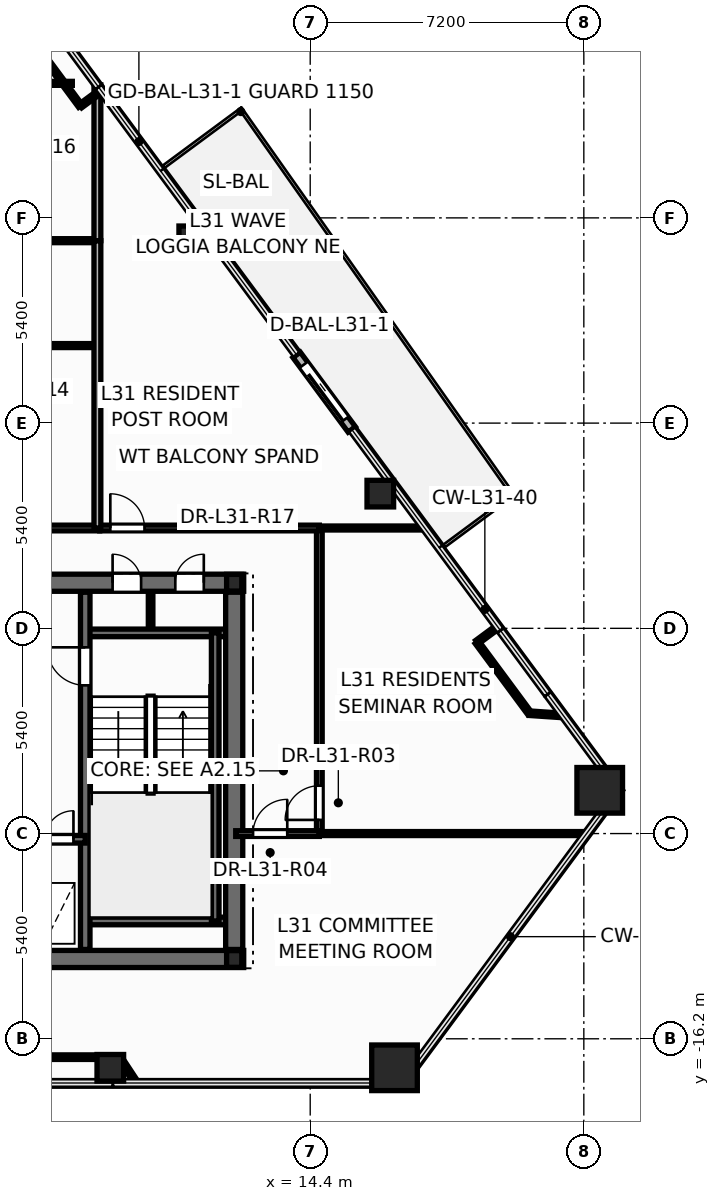
"""IFC4 building model, lengths in metres.
Left out: names, types, materials, properties, quantities, classifications, styles, units other than length and angle.
Written with IfcOpenShell. Run it as: python <this file> out.ifc"""

import sys

from ifc_helpers import new_model, si_unit, direction, frame, frame_2d, origin, origin_2d, place, context, subcontext, project, spatial, rectangle, hollow_rectangle, hollow_circle, i_section, extrude, element, fill, save


model = new_model("IFC4")
c1 = context("Model", 3, precision=1e-05, world=origin(), true_north=direction((0.0, 1.0)))
c2 = subcontext(c1, "Body", "Model", "MODEL_VIEW")
j1 = project(units=[si_unit("LENGTHUNIT", "METRE"), si_unit("PLANEANGLEUNIT", "RADIAN")], contexts=[c1])
p1 = place(None, origin())
s1 = spatial("IfcSite", under=j1, at=p1, CompositionType="ELEMENT")
p2 = place(p1, origin())
s2 = spatial("IfcBuilding", under=s1, at=p2, CompositionType="ELEMENT")
p3 = place(p2, frame((0.0, 0.0, 122.1)))
s3 = spatial("IfcBuildingStorey", under=s2, at=p3, CompositionType="ELEMENT", Elevation=122.1)
for number, where, z_axis, x_axis in (
    (1, (16.618, -16.963, 0.0), (0.0, 0.0, 1.0), (1.0, 0.0, 0.0)),
    (2, (22.019, -9.662, 0.0), (0.0, 0.0, 1.0), (1.0, 0.0, 0.0)),
):
    element("IfcColumn", number, at=place(p3, frame(where, z_axis=z_axis, x_axis=x_axis)), inside=s3, PredefinedType="COLUMN", context=c2, shape_type="SweptSolid", body=[
        extrude(hollow_rectangle(XDim=1.2, YDim=1.2, WallThickness=0.055, at=origin_2d()), origin(), (0.0, 0.0, 1.0), 3.6),
    ])
for number, where, z_axis, x_axis in (
    (3, (9.14, -16.963, 0.0), (0.0, 0.0, 1.0), (1.0, 0.0, 0.0)),
    (4, (16.245, -1.856, 0.0), (0.0, 0.0, 1.0), (1.0, 0.0, 0.0)),
    (5, (11.296, 4.836, 0.0), (0.0, 0.0, 1.0), (1.0, 0.0, 0.0)),
):
    element("IfcColumn", number, at=place(p3, frame(where, z_axis=z_axis, x_axis=x_axis)), inside=s3, PredefinedType="COLUMN", context=c2, shape_type="SweptSolid", body=[
        extrude(hollow_circle(Radius=0.35, WallThickness=0.03, at=origin_2d()), origin(), (0.0, 0.0, 1.0), 3.6),
    ])
for number, where, z_axis, x_axis in (
    (6, (12.4, -14.1, 0.0), (0.0, 0.0, 1.0), (1.0, 0.0, 0.0)),
    (7, (12.4, -4.2, 0.0), (0.0, 0.0, 1.0), (1.0, 0.0, 0.0)),
):
    element("IfcColumn", number, at=place(p3, frame(where, z_axis=z_axis, x_axis=x_axis)), inside=s3, PredefinedType="COLUMN", context=c2, shape_type="SweptSolid", body=[
        extrude(i_section(OverallWidth=0.4, OverallDepth=0.44, WebThickness=0.028, FlangeThickness=0.04, at=origin_2d()), origin(), (0.0, 0.0, 1.0), 3.6),
    ])
p4 = place(p3, frame((15.493, -0.166, -0.015), z_axis=(0.0, 0.0, 1.0), x_axis=(-0.594655490218, 0.803980626603, 0.0)))
e8 = element("IfcWall", 8, at=p4, inside=s3, PredefinedType="STANDARD", context=c2, shape_type="SweptSolid", body=[
    extrude(rectangle(XDim=2.44, YDim=0.24, at=frame_2d((1.22, 0.0))), origin(), (0.0, 0.0, 1.0), 2.807),
])
p5 = place(p4, frame((0.32, 0.0, 0.015)))
e9 = element("IfcOpeningElement", 9, at=p5, cuts=e8, PredefinedType="OPENING", context=c2, shape_type="SweptSolid", body=[
    extrude(rectangle(XDim=1.806, YDim=2.204, at=frame_2d((0.9, 1.102))), frame((0.0, 0.13, 0.0), z_axis=(0.0, -1.0, 0.0), x_axis=(1.0, 0.0, 0.0)), (0.0, 0.0, 1.0), 0.26),
])
p6 = place(p3, frame((10.2, -5.52, 0.0), z_axis=(0.0, 0.0, 1.0), x_axis=(0.0, 1.0, 0.0)))
e10 = element("IfcWall", 10, at=p6, inside=s3, PredefinedType="PARTITIONING", context=c2, shape_type="SweptSolid", body=[
    extrude(rectangle(XDim=1.12, YDim=0.12, at=frame_2d((0.56, 0.0))), origin(), (0.0, 0.0, 1.0), 3.35),
])
p7 = place(p3, frame((-12.65, -14.1, 0.0), z_axis=(0.0, 0.0, 1.0), x_axis=(1.0, 0.0, 0.0)))
e11 = element("IfcWall", 11, at=p7, inside=s3, PredefinedType="SHEAR", context=c2, shape_type="SweptSolid", body=[
    extrude(rectangle(XDim=25.3, YDim=0.45, at=frame_2d((12.65, 0.0))), origin(), (0.0, 0.0, 1.0), 3.6),
])
p8 = place(p3, frame((-12.65, -4.2, 0.0), z_axis=(0.0, 0.0, 1.0), x_axis=(1.0, 0.0, 0.0)))
e12 = element("IfcWall", 12, at=p8, inside=s3, PredefinedType="SHEAR", context=c2, shape_type="SweptSolid", body=[
    extrude(rectangle(XDim=25.3, YDim=0.45, at=frame_2d((12.65, 0.0))), origin(), (0.0, 0.0, 1.0), 3.6),
])
p9 = place(p8, frame((1.85, 0.0, 0.0)))
e13 = element("IfcOpeningElement", 13, at=p9, cuts=e12, PredefinedType="OPENING", context=c2, shape_type="SweptSolid", body=[
    extrude(rectangle(XDim=0.756, YDim=2.054, at=frame_2d((0.375, 1.027))), frame((0.0, 0.235, 0.0), z_axis=(0.0, -1.0, 0.0), x_axis=(1.0, 0.0, 0.0)), (0.0, 0.0, 1.0), 0.47),
])
p10 = place(p8, frame((21.85, 0.0, 0.0)))
e14 = element("IfcOpeningElement", 14, at=p10, cuts=e12, PredefinedType="OPENING", context=c2, shape_type="SweptSolid", body=[
    extrude(rectangle(XDim=0.756, YDim=2.054, at=frame_2d((0.375, 1.027))), frame((0.0, 0.235, 0.0), z_axis=(0.0, -1.0, 0.0), x_axis=(1.0, 0.0, 0.0)), (0.0, 0.0, 1.0), 0.47),
])
p11 = place(p8, frame((23.5, 0.0, 0.0)))
e15 = element("IfcOpeningElement", 15, at=p11, cuts=e12, PredefinedType="OPENING", context=c2, shape_type="SweptSolid", body=[
    extrude(rectangle(XDim=0.756, YDim=2.054, at=frame_2d((0.375, 1.027))), frame((0.0, 0.235, 0.0), z_axis=(0.0, -1.0, 0.0), x_axis=(1.0, 0.0, 0.0)), (0.0, 0.0, 1.0), 0.47),
])
p12 = place(p8, frame((5.85, 0.0, 0.0)))
e16 = element("IfcOpeningElement", 16, at=p12, cuts=e12, PredefinedType="OPENING", context=c2, shape_type="SweptSolid", body=[
    extrude(rectangle(XDim=1.006, YDim=2.104, at=frame_2d((0.5, 1.052))), frame((0.0, 0.235, 0.0), z_axis=(0.0, -1.0, 0.0), x_axis=(1.0, 0.0, 0.0)), (0.0, 0.0, 1.0), 0.47),
])
p13 = place(p8, frame((10.35, 0.0, 0.0)))
e17 = element("IfcOpeningElement", 17, at=p13, cuts=e12, PredefinedType="OPENING", context=c2, shape_type="SweptSolid", body=[
    extrude(rectangle(XDim=1.406, YDim=2.154, at=frame_2d((0.7, 1.077))), frame((0.0, 0.235, 0.0), z_axis=(0.0, -1.0, 0.0), x_axis=(1.0, 0.0, 0.0)), (0.0, 0.0, 1.0), 0.47),
])
p14 = place(p8, frame((18.45, 0.0, 0.0)))
e18 = element("IfcOpeningElement", 18, at=p14, cuts=e12, PredefinedType="OPENING", context=c2, shape_type="SweptSolid", body=[
    extrude(rectangle(XDim=1.006, YDim=2.104, at=frame_2d((0.5, 1.052))), frame((0.0, 0.235, 0.0), z_axis=(0.0, -1.0, 0.0), x_axis=(1.0, 0.0, 0.0)), (0.0, 0.0, 1.0), 0.47),
])
for number, where, z_axis, x_axis in (
    (19, (8.48, -5.52, 0.0), (0.0, 0.0, 1.0), (1.0, 0.0, 0.0)),
    (20, (8.48, -13.1, 0.0), (0.0, 0.0, 1.0), (1.0, 0.0, 0.0)),
):
    element("IfcWall", number, at=place(p3, frame(where, z_axis=z_axis, x_axis=x_axis)), inside=s3, PredefinedType="SOLIDWALL", context=c2, shape_type="SweptSolid", body=[
        extrude(rectangle(XDim=3.87, YDim=0.2, at=frame_2d((1.935, 0.0))), origin(), (0.0, 0.0, 1.0), 3.6),
    ])
p15 = place(p3, frame((11.9, -13.1, 0.0), z_axis=(0.0, 0.0, 1.0), x_axis=(0.0, 1.0, 0.0)))
e21 = element("IfcWall", 21, at=p15, inside=s3, PredefinedType="SOLIDWALL", context=c2, shape_type="SweptSolid", body=[
    extrude(rectangle(XDim=7.58, YDim=0.2, at=frame_2d((3.79, 0.0))), origin(), (0.0, 0.0, 1.0), 3.6),
])
p16 = place(p3, frame((8.48, -13.85, 0.0), z_axis=(0.0, 0.0, 1.0), x_axis=(0.0, 1.0, 0.0)))
e22 = element("IfcWall", 22, at=p16, inside=s3, PredefinedType="SHEAR", context=c2, shape_type="SweptSolid", body=[
    extrude(rectangle(XDim=9.4, YDim=0.25, at=frame_2d((4.7, 0.0))), origin(), (0.0, 0.0, 1.0), 3.6),
])
p17 = place(p16, frame((6.95, 0.0, 0.0)))
e23 = element("IfcOpeningElement", 23, at=p17, cuts=e22, PredefinedType="OPENING", context=c2, shape_type="SweptSolid", body=[
    extrude(rectangle(XDim=1.006, YDim=2.104, at=frame_2d((0.5, 1.052))), frame((0.0, 0.135, 0.0), z_axis=(0.0, -1.0, 0.0), x_axis=(1.0, 0.0, 0.0)), (0.0, 0.0, 1.0), 0.27),
])
p18 = place(p3, frame((5.12, -10.95, 0.0), z_axis=(0.0, 0.0, 1.0), x_axis=(1.0, 0.0, 0.0)))
e24 = element("IfcWall", 24, at=p18, inside=s3, PredefinedType="SOLIDWALL", context=c2, shape_type="SweptSolid", body=[
    extrude(rectangle(XDim=3.36, YDim=0.2, at=frame_2d((1.68, 0.0))), origin(), (0.0, 0.0, 1.0), 3.6),
])
p19 = place(p18, frame((0.42, 0.0, 0.0)))
e25 = element("IfcOpeningElement", 25, at=p19, cuts=e24, PredefinedType="OPENING", context=c2, shape_type="SweptSolid", body=[
    extrude(rectangle(XDim=1.106, YDim=2.104, at=frame_2d((0.55, 1.052))), frame((0.0, 0.11, 0.0), z_axis=(0.0, -1.0, 0.0), x_axis=(1.0, 0.0, 0.0)), (0.0, 0.0, 1.0), 0.22),
])
p20 = place(p18, frame((2.3, 0.0, 0.0)))
e26 = element("IfcOpeningElement", 26, at=p20, cuts=e24, PredefinedType="OPENING", context=c2, shape_type="SweptSolid", body=[
    extrude(rectangle(XDim=0.756, YDim=2.054, at=frame_2d((0.375, 1.027))), frame((0.0, 0.11, 0.0), z_axis=(0.0, -1.0, 0.0), x_axis=(1.0, 0.0, 0.0)), (0.0, 0.0, 1.0), 0.22),
])
p21 = place(p3, frame((12.4, -13.85, 0.0), z_axis=(0.0, 0.0, 1.0), x_axis=(0.0, 1.0, 0.0)))
e27 = element("IfcWall", 27, at=p21, inside=s3, PredefinedType="SHEAR", context=c2, shape_type="SweptSolid", body=[
    extrude(rectangle(XDim=9.4, YDim=0.45, at=frame_2d((4.7, 0.0))), origin(), (0.0, 0.0, 1.0), 3.6),
])
p22 = place(p3, frame((14.64, -10.8, 0.0), z_axis=(0.0, 0.0, 1.0), x_axis=(0.0, 1.0, 0.0)))
e28 = element("IfcWall", 28, at=p22, inside=s3, PredefinedType="PARTITIONING", context=c2, shape_type="SweptSolid", body=[
    extrude(rectangle(XDim=8.04, YDim=0.15, at=frame_2d((4.02, 0.0))), origin(), (0.0, 0.0, 1.0), 2.325),
])
p23 = place(p22, frame((0.359, 0.0, 0.0)))
e29 = element("IfcOpeningElement", 29, at=p23, cuts=e28, PredefinedType="OPENING", context=c2, shape_type="SweptSolid", body=[
    extrude(rectangle(XDim=0.906, YDim=2.104, at=frame_2d((0.45, 1.052))), frame((0.0, 0.085, 0.0), z_axis=(0.0, -1.0, 0.0), x_axis=(1.0, 0.0, 0.0)), (0.0, 0.0, 1.0), 0.17),
])
p24 = place(p3, frame((14.64, -10.8, 0.0), z_axis=(0.0, 0.0, 1.0), x_axis=(1.0, 0.0, 0.0)))
e30 = element("IfcWall", 30, at=p24, inside=s3, PredefinedType="PARTITIONING", context=c2, shape_type="SweptSolid", body=[
    extrude(rectangle(XDim=7.034, YDim=0.105, at=frame_2d((3.517, 0.0))), origin(), (0.0, 0.0, 1.0), 2.792),
])
p25 = place(p3, frame((2.36, -2.76, 0.0), z_axis=(0.0, 0.0, 1.0), x_axis=(1.0, 0.0, 0.0)))
e31 = element("IfcWall", 31, at=p25, inside=s3, PredefinedType="PARTITIONING", context=c2, shape_type="SweptSolid", body=[
    extrude(rectangle(XDim=6.5, YDim=0.15, at=frame_2d((3.25, 0.0))), origin(), (0.0, 0.0, 1.0), 2.325),
])
p26 = place(p25, frame((0.36, 0.0, 0.0)))
e32 = element("IfcOpeningElement", 32, at=p26, cuts=e31, PredefinedType="OPENING", context=c2, shape_type="SweptSolid", body=[
    extrude(rectangle(XDim=0.906, YDim=2.104, at=frame_2d((0.45, 1.052))), frame((0.0, 0.085, 0.0), z_axis=(0.0, -1.0, 0.0), x_axis=(1.0, 0.0, 0.0)), (0.0, 0.0, 1.0), 0.17),
])
p27 = place(p3, frame((8.862, -2.76, 0.0), z_axis=(0.0, 0.0, 1.0), x_axis=(1.0, 0.0, 0.0)))
e33 = element("IfcWall", 33, at=p27, inside=s3, PredefinedType="PARTITIONING", context=c2, shape_type="SweptSolid", body=[
    extrude(rectangle(XDim=5.778, YDim=0.15, at=frame_2d((2.889, 0.0))), origin(), (0.0, 0.0, 1.0), 3.35),
])
p28 = place(p27, frame((0.278, 0.0, 0.0)))
e34 = element("IfcOpeningElement", 34, at=p28, cuts=e33, PredefinedType="OPENING", context=c2, shape_type="SweptSolid", body=[
    extrude(rectangle(XDim=0.906, YDim=2.104, at=frame_2d((0.45, 1.052))), frame((0.0, 0.085, 0.0), z_axis=(0.0, -1.0, 0.0), x_axis=(1.0, 0.0, 0.0)), (0.0, 0.0, 1.0), 0.17),
])
p29 = place(p3, frame((2.36, 8.94, 0.0), z_axis=(0.0, 0.0, 1.0), x_axis=(1.0, 0.0, 0.0)))
e35 = element("IfcWall", 35, at=p29, inside=s3, PredefinedType="PARTITIONING", context=c2, shape_type="SweptSolid", body=[
    extrude(rectangle(XDim=5.78, YDim=0.105, at=frame_2d((2.89, 0.0))), origin(), (0.0, 0.0, 1.0), 2.617),
])
p30 = place(p29, frame((3.926, 0.0, 0.0)))
e36 = element("IfcOpeningElement", 36, at=p30, cuts=e35, PredefinedType="OPENING", context=c2, shape_type="SweptSolid", body=[
    extrude(rectangle(XDim=0.886, YDim=2.104, at=frame_2d((0.44, 1.052))), frame((0.0, 0.062, 0.0), z_axis=(0.0, -1.0, 0.0), x_axis=(1.0, 0.0, 0.0)), (0.0, 0.0, 1.0), 0.125),
])
p31 = place(p3, frame((3.84, 2.04, 0.0), z_axis=(0.0, 0.0, 1.0), x_axis=(1.0, 0.0, 0.0)))
e37 = element("IfcWall", 37, at=p31, inside=s3, PredefinedType="PARTITIONING", context=c2, shape_type="SweptSolid", body=[
    extrude(rectangle(XDim=4.96, YDim=0.105, at=frame_2d((2.48, 0.0))), origin(), (0.0, 0.0, 1.0), 2.325),
])
p32 = place(p31, frame((0.397, 0.0, 0.0)))
e38 = element("IfcOpeningElement", 38, at=p32, cuts=e37, PredefinedType="OPENING", context=c2, shape_type="SweptSolid", body=[
    extrude(rectangle(XDim=0.886, YDim=2.104, at=frame_2d((0.44, 1.052))), frame((0.0, 0.062, 0.0), z_axis=(0.0, -1.0, 0.0), x_axis=(1.0, 0.0, 0.0)), (0.0, 0.0, 1.0), 0.125),
])
p33 = place(p3, frame((3.9, 4.8, 0.0), z_axis=(0.0, 0.0, 1.0), x_axis=(1.0, 0.0, 0.0)))
e39 = element("IfcWall", 39, at=p33, inside=s3, PredefinedType="PARTITIONING", context=c2, shape_type="SweptSolid", body=[
    extrude(rectangle(XDim=4.9, YDim=0.105, at=frame_2d((2.45, 0.0))), origin(), (0.0, 0.0, 1.0), 2.617),
])
p34 = place(p33, frame((0.359, 0.0, 0.0)))
e40 = element("IfcOpeningElement", 40, at=p34, cuts=e39, PredefinedType="OPENING", context=c2, shape_type="SweptSolid", body=[
    extrude(rectangle(XDim=0.886, YDim=2.104, at=frame_2d((0.44, 1.052))), frame((0.0, 0.062, 0.0), z_axis=(0.0, -1.0, 0.0), x_axis=(1.0, 0.0, 0.0)), (0.0, 0.0, 1.0), 0.125),
])
p35 = place(p3, frame((8.8, -2.76, 0.0), z_axis=(0.0, 0.0, 1.0), x_axis=(0.0, 1.0, 0.0)))
e41 = element("IfcWall", 41, at=p35, inside=s3, PredefinedType="PARTITIONING", context=c2, shape_type="SweptSolid", body=[
    extrude(rectangle(XDim=7.56, YDim=0.18, at=frame_2d((3.78, 0.0))), origin(), (0.0, 0.0, 1.0), 2.617),
])
p36 = place(p3, frame((8.8, 4.8, 0.0), z_axis=(0.0, 0.0, 1.0), x_axis=(0.0, 1.0, 0.0)))
e42 = element("IfcWall", 42, at=p36, inside=s3, PredefinedType="PARTITIONING", context=c2, shape_type="SweptSolid", body=[
    extrude(rectangle(XDim=4.1, YDim=0.18, at=frame_2d((2.05, 0.0))), origin(), (0.0, 0.0, 1.0), 2.617),
])
p37 = place(p3, frame((5.744, -16.683, 0.0), z_axis=(0.0, 0.0, 1.0), x_axis=(1.0, 0.0, 0.0)))
e43 = element("IfcWall", 43, at=p37, inside=s3, PredefinedType="PARTITIONING", context=c2, shape_type="SweptSolid", body=[
    extrude(rectangle(XDim=3.632, YDim=0.12, at=frame_2d((1.816, 0.0))), origin(), (0.0, 0.0, 1.0), 2.792),
])
p38 = place(p3, frame((14.64, -2.76, 0.0), z_axis=(0.0, 0.0, 1.0), x_axis=(1.0, 0.0, 0.0)))
e44 = element("IfcWall", 44, at=p38, inside=s3, PredefinedType="PARTITIONING", context=c2, shape_type="SweptSolid", body=[
    extrude(rectangle(XDim=2.771, YDim=0.105, at=frame_2d((1.386, 0.0))), origin(), (0.0, 0.0, 1.0), 2.792),
])
p39 = place(p3, frame((8.353, 8.344, 0.0), z_axis=(0.0, 0.0, 1.0), x_axis=(-0.594589014846, 0.804029790135, 0.0)))
e45 = element("IfcWall", 45, at=p39, inside=s3, PredefinedType="PARTITIONING", context=c2, shape_type="SweptSolid", body=[
    extrude(rectangle(XDim=2.323, YDim=0.12, at=frame_2d((1.162, 0.0))), origin(), (0.0, 0.0, 1.0), 3.35),
])
p40 = place(p3, frame((12.44, -10.8, 0.0), z_axis=(0.0, 0.0, 1.0), x_axis=(1.0, 0.0, 0.0)))
e46 = element("IfcWall", 46, at=p40, inside=s3, PredefinedType="PARTITIONING", context=c2, shape_type="SweptSolid", body=[
    extrude(rectangle(XDim=2.2, YDim=0.15, at=frame_2d((1.1, 0.0))), origin(), (0.0, 0.0, 1.0), 2.792),
])
p41 = place(p40, frame((0.456, 0.0, 0.0)))
e47 = element("IfcOpeningElement", 47, at=p41, cuts=e46, PredefinedType="OPENING", context=c2, shape_type="SweptSolid", body=[
    extrude(rectangle(XDim=0.906, YDim=2.104, at=frame_2d((0.45, 1.052))), frame((0.0, 0.085, 0.0), z_axis=(0.0, -1.0, 0.0), x_axis=(1.0, 0.0, 0.0)), (0.0, 0.0, 1.0), 0.17),
])
p42 = place(p3, frame((20.17, -7.633, 0.0), z_axis=(0.0, 0.0, 1.0), x_axis=(-0.59468950564, 0.803955466355, 0.0)))
e48 = element("IfcWall", 48, at=p42, inside=s3, PredefinedType="PARTITIONING", context=c2, shape_type="SweptSolid", body=[
    extrude(rectangle(XDim=2.323, YDim=0.12, at=frame_2d((1.161, 0.0))), origin(), (0.0, 0.0, 1.0), 3.35),
])
p43 = place(p3, frame((21.047, -7.693, 0.0), z_axis=(0.0, 0.0, 1.0), x_axis=(-0.997720805556, 0.067477360354, 0.0)))
e49 = element("IfcWall", 49, at=p43, inside=s3, PredefinedType="PARTITIONING", context=c2, shape_type="SweptSolid", body=[
    extrude(rectangle(XDim=0.879, YDim=0.12, at=frame_2d((0.439, 0.0))), origin(), (0.0, 0.0, 1.0), 2.792),
])
p44 = place(p3, frame((9.376, -16.683, 0.0), z_axis=(0.0, 0.0, 1.0), x_axis=(0.550409775631, -0.834894651372, 0.0)))
e50 = element("IfcWall", 50, at=p44, inside=s3, PredefinedType="PARTITIONING", context=c2, shape_type="SweptSolid", body=[
    extrude(rectangle(XDim=0.802, YDim=0.12, at=frame_2d((0.401, 0.0))), origin(), (0.0, 0.0, 1.0), 2.792),
])
for number, where, z_axis, x_axis in (
    (51, (8.891, 8.743, 0.0), (0.0, 0.0, 1.0), (-0.804, -0.595, 0.0)),
    (52, (18.789, -5.766, 0.0), (0.0, 0.0, 1.0), (0.804, 0.595, 0.0)),
):
    element("IfcWall", number, at=place(p3, frame(where, z_axis=z_axis, x_axis=x_axis)), inside=s3, PredefinedType="PARTITIONING", context=c2, shape_type="SweptSolid", body=[
        extrude(rectangle(XDim=0.67, YDim=0.12, at=frame_2d((0.335, 0.0))), origin(), (0.0, 0.0, 1.0), 2.792),
    ])
p45 = place(p5, origin())
e53 = element("IfcDoor", 53, at=p45, inside=s3, OperationType="SLIDING_TO_LEFT", PredefinedType="DOOR", context=c2, shape_type="SweptSolid", body=[
    extrude(rectangle(XDim=1.8, YDim=2.2, at=frame_2d((0.9, 1.1))), frame((0.0, 0.025, 0.0), z_axis=(0.0, -1.0, 0.0), x_axis=(1.0, 0.0, 0.0)), (0.0, 0.0, 1.0), 0.05),
])
fill(e9, e53)
p46 = place(p17, origin())
e54 = element("IfcDoor", 54, at=p46, inside=s3, OperationType="SINGLE_SWING_RIGHT", PredefinedType="DOOR", context=c2, shape_type="SweptSolid", body=[
    extrude(rectangle(XDim=1.0, YDim=2.1, at=frame_2d((0.5, 1.05))), frame((0.0, 0.025, 0.0), z_axis=(0.0, -1.0, 0.0), x_axis=(1.0, 0.0, 0.0)), (0.0, 0.0, 1.0), 0.05),
])
fill(e23, e54)
p47 = place(p20, origin())
e55 = element("IfcDoor", 55, at=p47, inside=s3, OperationType="SINGLE_SWING_RIGHT", PredefinedType="DOOR", context=c2, shape_type="SweptSolid", body=[
    extrude(rectangle(XDim=0.75, YDim=2.05, at=frame_2d((0.375, 1.025))), frame((0.0, 0.025, 0.0), z_axis=(0.0, -1.0, 0.0), x_axis=(1.0, 0.0, 0.0)), (0.0, 0.0, 1.0), 0.05),
])
fill(e26, e55)
p48 = place(p10, origin())
e56 = element("IfcDoor", 56, at=p48, inside=s3, OperationType="SINGLE_SWING_LEFT", PredefinedType="DOOR", context=c2, shape_type="SweptSolid", body=[
    extrude(rectangle(XDim=0.75, YDim=2.05, at=frame_2d((0.375, 1.025))), frame((0.0, 0.025, 0.0), z_axis=(0.0, -1.0, 0.0), x_axis=(1.0, 0.0, 0.0)), (0.0, 0.0, 1.0), 0.05),
])
fill(e14, e56)
p49 = place(p11, origin())
e57 = element("IfcDoor", 57, at=p49, inside=s3, OperationType="SINGLE_SWING_RIGHT", PredefinedType="DOOR", context=c2, shape_type="SweptSolid", body=[
    extrude(rectangle(XDim=0.75, YDim=2.05, at=frame_2d((0.375, 1.025))), frame((0.0, 0.025, 0.0), z_axis=(0.0, -1.0, 0.0), x_axis=(1.0, 0.0, 0.0)), (0.0, 0.0, 1.0), 0.05),
])
fill(e15, e57)
p50 = place(p23, origin())
e58 = element("IfcDoor", 58, at=p50, inside=s3, OperationType="SINGLE_SWING_LEFT", PredefinedType="DOOR", context=c2, shape_type="SweptSolid", body=[
    extrude(rectangle(XDim=0.9, YDim=2.1, at=frame_2d((0.45, 1.05))), frame((0.0, 0.025, 0.0), z_axis=(0.0, -1.0, 0.0), x_axis=(1.0, 0.0, 0.0)), (0.0, 0.0, 1.0), 0.05),
])
fill(e29, e58)
p51 = place(p41, origin())
e59 = element("IfcDoor", 59, at=p51, inside=s3, OperationType="SINGLE_SWING_RIGHT", PredefinedType="DOOR", context=c2, shape_type="SweptSolid", body=[
    extrude(rectangle(XDim=0.9, YDim=2.1, at=frame_2d((0.45, 1.05))), frame((0.0, 0.025, 0.0), z_axis=(0.0, -1.0, 0.0), x_axis=(1.0, 0.0, 0.0)), (0.0, 0.0, 1.0), 0.05),
])
fill(e47, e59)
p52 = place(p28, origin())
e60 = element("IfcDoor", 60, at=p52, inside=s3, OperationType="SINGLE_SWING_LEFT", PredefinedType="DOOR", context=c2, shape_type="SweptSolid", body=[
    extrude(rectangle(XDim=0.9, YDim=2.1, at=frame_2d((0.45, 1.05))), frame((0.0, 0.025, 0.0), z_axis=(0.0, -1.0, 0.0), x_axis=(1.0, 0.0, 0.0)), (0.0, 0.0, 1.0), 0.05),
])
fill(e34, e60)
save(model, sys.argv[1])
